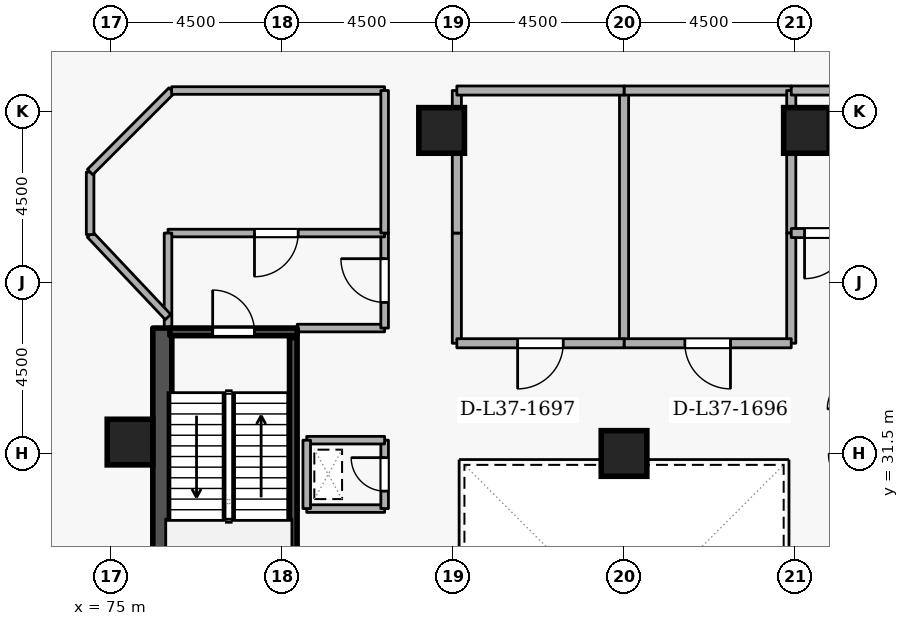
"""IFC4 building model, lengths in metres.
Left out: names, types, materials, properties, quantities, classifications, styles, units other than length and angle.
Written with IfcOpenShell. Run it as: python <this file> out.ifc"""

import sys

from ifc_helpers import new_model, si_unit, direction, frame, frame_2d, origin, origin_2d, place, context, subcontext, project, spatial, rectangle, extrude, element, fill, save


model = new_model("IFC4")
c1 = context("Model", 3, precision=1e-05, world=origin(), true_north=direction((0.0, 1.0)))
c2 = subcontext(c1, "Body", "Model", "MODEL_VIEW")
j1 = project(units=[si_unit("LENGTHUNIT", "METRE"), si_unit("PLANEANGLEUNIT", "RADIAN")], contexts=[c1])
p1 = place(None, origin())
s1 = spatial("IfcSite", under=j1, at=p1, CompositionType="ELEMENT")
p2 = place(p1, origin())
s2 = spatial("IfcBuilding", under=s1, at=p2, CompositionType="ELEMENT")
p3 = place(p2, frame((0.0, 0.0, 141.3)))
s3 = spatial("IfcBuildingStorey", under=s2, at=p3, CompositionType="ELEMENT", Elevation=141.3)
p4 = place(p3, frame((76.35, 19.2, 0.0), z_axis=(0.0, 0.0, 1.0), x_axis=(0.0, 1.0, 0.0)))
e1 = element("IfcWall", 1, at=p4, inside=s3, PredefinedType="SHEAR", context=c2, shape_type="SweptSolid", body=[
    extrude(rectangle(XDim=15.6, YDim=0.5, at=frame_2d((7.8, 0.0))), origin(), (0.0, 0.0, 1.0), 4.2),
])
for number, where, z_axis, x_axis in (
    (2, (93.3, 40.0, 0.0), (0.0, 0.0, 1.0), (1.0, 0.0, 0.0)),
    (3, (83.7, 40.0, 0.0), (0.0, 0.0, 1.0), (1.0, 0.0, 0.0)),
    (4, (75.5, 31.8, 0.0), (0.0, 0.0, 1.0), (1.0, 0.0, 0.0)),
    (5, (88.5, 31.5, 0.0), (0.0, 0.0, 1.0), (1.0, 0.0, 0.0)),
):
    element("IfcColumn", number, at=place(p3, frame(where, z_axis=z_axis, x_axis=x_axis)), inside=s3, PredefinedType="COLUMN", context=c2, shape_type="SweptSolid", body=[
        extrude(rectangle(XDim=1.2, YDim=1.2, at=origin_2d()), origin(), (0.0, 0.0, 1.0), 4.2),
    ])
p5 = place(p3, frame((76.55, 34.7, 0.0), z_axis=(0.0, 0.0, 1.0), x_axis=(1.0, 0.0, 0.0)))
e6 = element("IfcWall", 6, at=p5, inside=s3, PredefinedType="SHEAR", context=c2, shape_type="SweptSolid", body=[
    extrude(rectangle(XDim=3.35, YDim=0.2, at=frame_2d((1.675, 0.0))), origin(), (0.0, 0.0, 1.0), 4.2),
])
p6 = place(p5, frame((1.125, 0.0, 0.0)))
e7 = element("IfcOpeningElement", 7, at=p6, cuts=e6, PredefinedType="OPENING", context=c2, shape_type="SweptSolid", body=[
    extrude(rectangle(XDim=1.1, YDim=2.1, at=frame_2d((0.55, 1.05))), frame((0.0, 0.11, 0.0), z_axis=(0.0, -1.0, 0.0), x_axis=(1.0, 0.0, 0.0)), (0.0, 0.0, 1.0), 0.22),
])
p7 = place(p3, frame((79.797, 27.45, 0.0), z_axis=(0.0, 0.0, 1.0), x_axis=(0.0, 1.0, 0.0)))
e8 = element("IfcWall", 8, at=p7, inside=s3, PredefinedType="SHEAR", context=c2, shape_type="SweptSolid", body=[
    extrude(rectangle(XDim=7.1, YDim=0.2, at=frame_2d((3.55, 0.0))), origin(), (0.0, 0.0, 1.0), 4.2),
])
p8 = place(p3, frame((79.9, 34.8, 0.0), z_axis=(0.0, 0.0, 1.0), x_axis=(1.0, 0.0, 0.0)))
e9 = element("IfcWall", 9, at=p8, inside=s3, PredefinedType="STANDARD", context=c2, shape_type="SweptSolid", body=[
    extrude(rectangle(XDim=2.3, YDim=0.2, at=frame_2d((1.15, 0.0))), origin(), (0.0, 0.0, 1.0), 3.145),
])
p9 = place(p3, frame((82.2, 34.8, 0.0), z_axis=(0.0, 0.0, 1.0), x_axis=(0.0, 1.0, 0.0)))
e10 = element("IfcWall", 10, at=p9, inside=s3, PredefinedType="STANDARD", context=c2, shape_type="SweptSolid", body=[
    extrude(rectangle(XDim=2.5, YDim=0.2, at=frame_2d((1.25, 0.0))), origin(), (0.0, 0.0, 1.0), 3.94),
])
p10 = place(p9, frame((0.675, 0.0, 0.0)))
e11 = element("IfcOpeningElement", 11, at=p10, cuts=e10, PredefinedType="OPENING", context=c2, shape_type="SweptSolid", body=[
    extrude(rectangle(XDim=1.15, YDim=2.1, at=frame_2d((0.575, 1.05))), frame((0.0, 0.11, 0.0), z_axis=(0.0, -1.0, 0.0), x_axis=(1.0, 0.0, 0.0)), (0.0, 0.0, 1.0), 0.22),
])
p11 = place(p3, frame((82.2, 37.3, 0.0), z_axis=(0.0, 0.0, 1.0), x_axis=(-1.0, 0.0, 0.0)))
e12 = element("IfcWall", 12, at=p11, inside=s3, PredefinedType="STANDARD", context=c2, shape_type="SweptSolid", body=[
    extrude(rectangle(XDim=5.7, YDim=0.2, at=frame_2d((2.85, 0.0))), origin(), (0.0, 0.0, 1.0), 3.94),
])
p12 = place(p11, frame((2.275, 0.0, 0.0)))
e13 = element("IfcOpeningElement", 13, at=p12, cuts=e12, PredefinedType="OPENING", context=c2, shape_type="SweptSolid", body=[
    extrude(rectangle(XDim=1.15, YDim=2.1, at=frame_2d((0.575, 1.05))), frame((0.0, 0.11, 0.0), z_axis=(0.0, -1.0, 0.0), x_axis=(1.0, 0.0, 0.0)), (0.0, 0.0, 1.0), 0.22),
])
p13 = place(p3, frame((76.5, 37.3, 0.0), z_axis=(0.0, 0.0, 1.0), x_axis=(0.0, -1.0, 0.0)))
e14 = element("IfcWall", 14, at=p13, inside=s3, PredefinedType="STANDARD", context=c2, shape_type="SweptSolid", body=[
    extrude(rectangle(XDim=2.5, YDim=0.2, at=frame_2d((1.25, 0.0))), origin(), (0.0, 0.0, 1.0), 3.94),
])
p14 = place(p3, frame((80.15, 30.05, 0.0), z_axis=(0.0, 0.0, 1.0), x_axis=(1.0, 0.0, 0.0)))
e15 = element("IfcWall", 15, at=p14, inside=s3, PredefinedType="STANDARD", context=c2, shape_type="SweptSolid", body=[
    extrude(rectangle(XDim=2.05, YDim=0.2, at=frame_2d((1.025, 0.0))), origin(), (0.0, 0.0, 1.0), 3.94),
])
p15 = place(p3, frame((82.2, 30.05, 0.0), z_axis=(0.0, 0.0, 1.0), x_axis=(0.0, 1.0, 0.0)))
e16 = element("IfcWall", 16, at=p15, inside=s3, PredefinedType="STANDARD", context=c2, shape_type="SweptSolid", body=[
    extrude(rectangle(XDim=1.8, YDim=0.2, at=frame_2d((0.9, 0.0))), origin(), (0.0, 0.0, 1.0), 3.94),
])
p16 = place(p15, frame((0.46, 0.0, 0.0)))
e17 = element("IfcOpeningElement", 17, at=p16, cuts=e16, PredefinedType="OPENING", context=c2, shape_type="SweptSolid", body=[
    extrude(rectangle(XDim=0.88, YDim=2.04, at=frame_2d((0.44, 1.02))), frame((0.0, 0.11, 0.0), z_axis=(0.0, -1.0, 0.0), x_axis=(1.0, 0.0, 0.0)), (0.0, 0.0, 1.0), 0.22),
])
p17 = place(p3, frame((82.2, 31.85, 0.0), z_axis=(0.0, 0.0, 1.0), x_axis=(-1.0, 0.0, 0.0)))
e18 = element("IfcWall", 18, at=p17, inside=s3, PredefinedType="STANDARD", context=c2, shape_type="SweptSolid", body=[
    extrude(rectangle(XDim=2.05, YDim=0.2, at=frame_2d((1.025, 0.0))), origin(), (0.0, 0.0, 1.0), 3.94),
])
p18 = place(p3, frame((80.15, 31.85, 0.0), z_axis=(0.0, 0.0, 1.0), x_axis=(0.0, -1.0, 0.0)))
e19 = element("IfcWall", 19, at=p18, inside=s3, PredefinedType="STANDARD", context=c2, shape_type="SweptSolid", body=[
    extrude(rectangle(XDim=1.8, YDim=0.2, at=frame_2d((0.9, 0.0))), origin(), (0.0, 0.0, 1.0), 3.94),
])
p19 = place(p3, frame((88.5, 34.4, 0.0), z_axis=(0.0, 0.0, 1.0), x_axis=(0.0, 1.0, 0.0)))
e20 = element("IfcWall", 20, at=p19, inside=s3, PredefinedType="STANDARD", context=c2, shape_type="SweptSolid", body=[
    extrude(rectangle(XDim=6.65, YDim=0.24, at=frame_2d((3.325, 0.0))), origin(), (0.0, 0.0, 1.0), 3.325),
])
p20 = place(p3, frame((88.5, 41.05, 0.0), z_axis=(0.0, 0.0, 1.0), x_axis=(1.0, 0.0, 0.0)))
e21 = element("IfcWall", 21, at=p20, inside=s3, PredefinedType="STANDARD", context=c2, shape_type="SweptSolid", body=[
    extrude(rectangle(XDim=4.4, YDim=0.24, at=frame_2d((2.2, 0.0))), origin(), (0.0, 0.0, 1.0), 3.94),
])
p21 = place(p3, frame((92.9, 41.05, 0.0), z_axis=(0.0, 0.0, 1.0), x_axis=(0.0, -1.0, 0.0)))
e22 = element("IfcWall", 22, at=p21, inside=s3, PredefinedType="STANDARD", context=c2, shape_type="SweptSolid", body=[
    extrude(rectangle(XDim=3.75, YDim=0.24, at=frame_2d((1.875, 0.0))), origin(), (0.0, 0.0, 1.0), 3.94),
])
p22 = place(p3, frame((92.9, 37.3, 0.0), z_axis=(0.0, 0.0, 1.0), x_axis=(0.0, -1.0, 0.0)))
e23 = element("IfcWall", 23, at=p22, inside=s3, PredefinedType="STANDARD", context=c2, shape_type="SweptSolid", body=[
    extrude(rectangle(XDim=2.9, YDim=0.24, at=frame_2d((1.45, 0.0))), origin(), (0.0, 0.0, 1.0), 3.94),
])
p23 = place(p3, frame((92.9, 34.4, 0.0), z_axis=(0.0, 0.0, 1.0), x_axis=(-1.0, 0.0, 0.0)))
e24 = element("IfcWall", 24, at=p23, inside=s3, PredefinedType="STANDARD", context=c2, shape_type="SweptSolid", body=[
    extrude(rectangle(XDim=4.4, YDim=0.24, at=frame_2d((2.2, 0.0))), origin(), (0.0, 0.0, 1.0), 3.145),
])
p24 = place(p23, frame((1.6, 0.0, 0.0)))
e25 = element("IfcOpeningElement", 25, at=p24, cuts=e24, PredefinedType="OPENING", context=c2, shape_type="SweptSolid", body=[
    extrude(rectangle(XDim=1.2, YDim=2.1, at=frame_2d((0.6, 1.05))), frame((0.0, 0.13, 0.0), z_axis=(0.0, -1.0, 0.0), x_axis=(1.0, 0.0, 0.0)), (0.0, 0.0, 1.0), 0.26),
])
p25 = place(p3, frame((84.1, 34.4, 0.0), z_axis=(0.0, 0.0, 1.0), x_axis=(0.0, 1.0, 0.0)))
e26 = element("IfcWall", 26, at=p25, inside=s3, PredefinedType="STANDARD", context=c2, shape_type="SweptSolid", body=[
    extrude(rectangle(XDim=2.9, YDim=0.24, at=frame_2d((1.45, 0.0))), origin(), (0.0, 0.0, 1.0), 3.94),
])
p26 = place(p3, frame((84.1, 37.3, 0.0), z_axis=(0.0, 0.0, 1.0), x_axis=(0.0, 1.0, 0.0)))
e27 = element("IfcWall", 27, at=p26, inside=s3, PredefinedType="STANDARD", context=c2, shape_type="SweptSolid", body=[
    extrude(rectangle(XDim=3.75, YDim=0.24, at=frame_2d((1.875, 0.0))), origin(), (0.0, 0.0, 1.0), 3.94),
])
p27 = place(p3, frame((84.1, 41.05, 0.0), z_axis=(0.0, 0.0, 1.0), x_axis=(1.0, 0.0, 0.0)))
e28 = element("IfcWall", 28, at=p27, inside=s3, PredefinedType="STANDARD", context=c2, shape_type="SweptSolid", body=[
    extrude(rectangle(XDim=4.4, YDim=0.24, at=frame_2d((2.2, 0.0))), origin(), (0.0, 0.0, 1.0), 3.94),
])
p28 = place(p3, frame((88.5, 34.4, 0.0), z_axis=(0.0, 0.0, 1.0), x_axis=(-1.0, 0.0, 0.0)))
e29 = element("IfcWall", 29, at=p28, inside=s3, PredefinedType="STANDARD", context=c2, shape_type="SweptSolid", body=[
    extrude(rectangle(XDim=4.4, YDim=0.24, at=frame_2d((2.2, 0.0))), origin(), (0.0, 0.0, 1.0), 3.145),
])
p29 = place(p28, frame((1.6, 0.0, 0.0)))
e30 = element("IfcOpeningElement", 30, at=p29, cuts=e29, PredefinedType="OPENING", context=c2, shape_type="SweptSolid", body=[
    extrude(rectangle(XDim=1.2, YDim=2.1, at=frame_2d((0.6, 1.05))), frame((0.0, 0.13, 0.0), z_axis=(0.0, -1.0, 0.0), x_axis=(1.0, 0.0, 0.0)), (0.0, 0.0, 1.0), 0.26),
])
p30 = place(p3, frame((76.5, 35.09, 0.0), z_axis=(0.0, 0.0, 1.0), x_axis=(-0.686825256468, 0.726822582944, 0.0)))
e31 = element("IfcWall", 31, at=p30, inside=s3, PredefinedType="STANDARD", context=c2, shape_type="SweptSolid", body=[
    extrude(rectangle(XDim=2.985, YDim=0.2, at=frame_2d((1.492, 0.0))), origin(), (0.0, 0.0, 1.0), 3.94),
])
p31 = place(p3, frame((74.45, 37.26, 0.0), z_axis=(0.0, 0.0, 1.0), x_axis=(0.0, 1.0, 0.0)))
e32 = element("IfcWall", 32, at=p31, inside=s3, PredefinedType="STANDARD", context=c2, shape_type="SweptSolid", body=[
    extrude(rectangle(XDim=1.646, YDim=0.2, at=frame_2d((0.823, 0.0))), origin(), (0.0, 0.0, 1.0), 3.445),
])
p32 = place(p3, frame((74.45, 38.905, 0.0), z_axis=(0.0, 0.0, 1.0), x_axis=(0.707106781187, 0.707106781187, 0.0)))
e33 = element("IfcWall", 33, at=p32, inside=s3, PredefinedType="STANDARD", context=c2, shape_type="SweptSolid", body=[
    extrude(rectangle(XDim=3.033, YDim=0.2, at=frame_2d((1.517, 0.0))), origin(), (0.0, 0.0, 1.0), 3.94),
])
p33 = place(p3, frame((76.595, 41.05, 0.0), z_axis=(0.0, 0.0, 1.0), x_axis=(1.0, 0.0, 0.0)))
e34 = element("IfcWall", 34, at=p33, inside=s3, PredefinedType="STANDARD", context=c2, shape_type="SweptSolid", body=[
    extrude(rectangle(XDim=5.605, YDim=0.2, at=frame_2d((2.803, 0.0))), origin(), (0.0, 0.0, 1.0), 3.94),
])
p34 = place(p3, frame((82.2, 41.05, 0.0), z_axis=(0.0, 0.0, 1.0), x_axis=(0.0, -1.0, 0.0)))
e35 = element("IfcWall", 35, at=p34, inside=s3, PredefinedType="STANDARD", context=c2, shape_type="SweptSolid", body=[
    extrude(rectangle(XDim=3.75, YDim=0.2, at=frame_2d((1.875, 0.0))), origin(), (0.0, 0.0, 1.0), 3.94),
])
p35 = place(p3, frame((94.8, 37.3, 0.0), z_axis=(0.0, 0.0, 1.0), x_axis=(-1.0, 0.0, 0.0)))
e36 = element("IfcWall", 36, at=p35, inside=s3, PredefinedType="STANDARD", context=c2, shape_type="SweptSolid", body=[
    extrude(rectangle(XDim=1.9, YDim=0.24, at=frame_2d((0.95, 0.0))), origin(), (0.0, 0.0, 1.0), 3.94),
])
p36 = place(p35, frame((0.35, 0.0, 0.0)))
e37 = element("IfcOpeningElement", 37, at=p36, cuts=e36, PredefinedType="OPENING", context=c2, shape_type="SweptSolid", body=[
    extrude(rectangle(XDim=1.2, YDim=2.1, at=frame_2d((0.6, 1.05))), frame((0.0, 0.13, 0.0), z_axis=(0.0, -1.0, 0.0), x_axis=(1.0, 0.0, 0.0)), (0.0, 0.0, 1.0), 0.26),
])
p37 = place(p3, frame((92.9, 41.05, 0.0), z_axis=(0.0, 0.0, 1.0), x_axis=(1.0, 0.0, 0.0)))
e38 = element("IfcWall", 38, at=p37, inside=s3, PredefinedType="STANDARD", context=c2, shape_type="SweptSolid", body=[
    extrude(rectangle(XDim=7.4, YDim=0.24, at=frame_2d((3.7, 0.0))), origin(), (0.0, 0.0, 1.0), 3.94),
])
p38 = place(p6, origin())
e39 = element("IfcDoor", 39, at=p38, inside=s3, OperationType="SINGLE_SWING_LEFT", PredefinedType="DOOR", context=c2, shape_type="SweptSolid", body=[
    extrude(rectangle(XDim=1.1, YDim=2.1, at=frame_2d((0.55, 1.05))), frame((0.0, 0.025, 0.0), z_axis=(0.0, -1.0, 0.0), x_axis=(1.0, 0.0, 0.0)), (0.0, 0.0, 1.0), 0.05),
])
fill(e7, e39)
p39 = place(p10, origin())
e40 = element("IfcDoor", 40, at=p39, inside=s3, OperationType="SINGLE_SWING_RIGHT", PredefinedType="DOOR", context=c2, shape_type="SweptSolid", body=[
    extrude(rectangle(XDim=1.15, YDim=2.1, at=frame_2d((0.575, 1.05))), frame((0.0, 0.025, 0.0), z_axis=(0.0, -1.0, 0.0), x_axis=(1.0, 0.0, 0.0)), (0.0, 0.0, 1.0), 0.05),
])
fill(e11, e40)
p40 = place(p16, origin())
e41 = element("IfcDoor", 41, at=p40, inside=s3, OperationType="SINGLE_SWING_RIGHT", PredefinedType="DOOR", context=c2, shape_type="SweptSolid", body=[
    extrude(rectangle(XDim=0.88, YDim=2.04, at=frame_2d((0.44, 1.02))), frame((0.0, 0.025, 0.0), z_axis=(0.0, -1.0, 0.0), x_axis=(1.0, 0.0, 0.0)), (0.0, 0.0, 1.0), 0.05),
])
fill(e17, e41)
p41 = place(p24, origin())
e42 = element("IfcDoor", 42, at=p41, inside=s3, OperationType="SINGLE_SWING_LEFT", PredefinedType="DOOR", context=c2, shape_type="SweptSolid", body=[
    extrude(rectangle(XDim=1.2, YDim=2.1, at=frame_2d((0.6, 1.05))), frame((0.0, 0.025, 0.0), z_axis=(0.0, -1.0, 0.0), x_axis=(1.0, 0.0, 0.0)), (0.0, 0.0, 1.0), 0.05),
])
fill(e25, e42)
p42 = place(p29, origin())
e43 = element("IfcDoor", 43, at=p42, inside=s3, OperationType="SINGLE_SWING_RIGHT", PredefinedType="DOOR", context=c2, shape_type="SweptSolid", body=[
    extrude(rectangle(XDim=1.2, YDim=2.1, at=frame_2d((0.6, 1.05))), frame((0.0, 0.025, 0.0), z_axis=(0.0, -1.0, 0.0), x_axis=(1.0, 0.0, 0.0)), (0.0, 0.0, 1.0), 0.05),
])
fill(e30, e43)
p43 = place(p12, origin())
e44 = element("IfcDoor", 44, at=p43, inside=s3, OperationType="SINGLE_SWING_RIGHT", PredefinedType="DOOR", context=c2, shape_type="SweptSolid", body=[
    extrude(rectangle(XDim=1.15, YDim=2.1, at=frame_2d((0.575, 1.05))), frame((0.0, 0.025, 0.0), z_axis=(0.0, -1.0, 0.0), x_axis=(1.0, 0.0, 0.0)), (0.0, 0.0, 1.0), 0.05),
])
fill(e13, e44)
p44 = place(p36, origin())
e45 = element("IfcDoor", 45, at=p44, inside=s3, OperationType="SINGLE_SWING_RIGHT", PredefinedType="DOOR", context=c2, shape_type="SweptSolid", body=[
    extrude(rectangle(XDim=1.2, YDim=2.1, at=frame_2d((0.6, 1.05))), frame((0.0, 0.025, 0.0), z_axis=(0.0, -1.0, 0.0), x_axis=(1.0, 0.0, 0.0)), (0.0, 0.0, 1.0), 0.05),
])
fill(e37, e45)
save(model, sys.argv[1])
